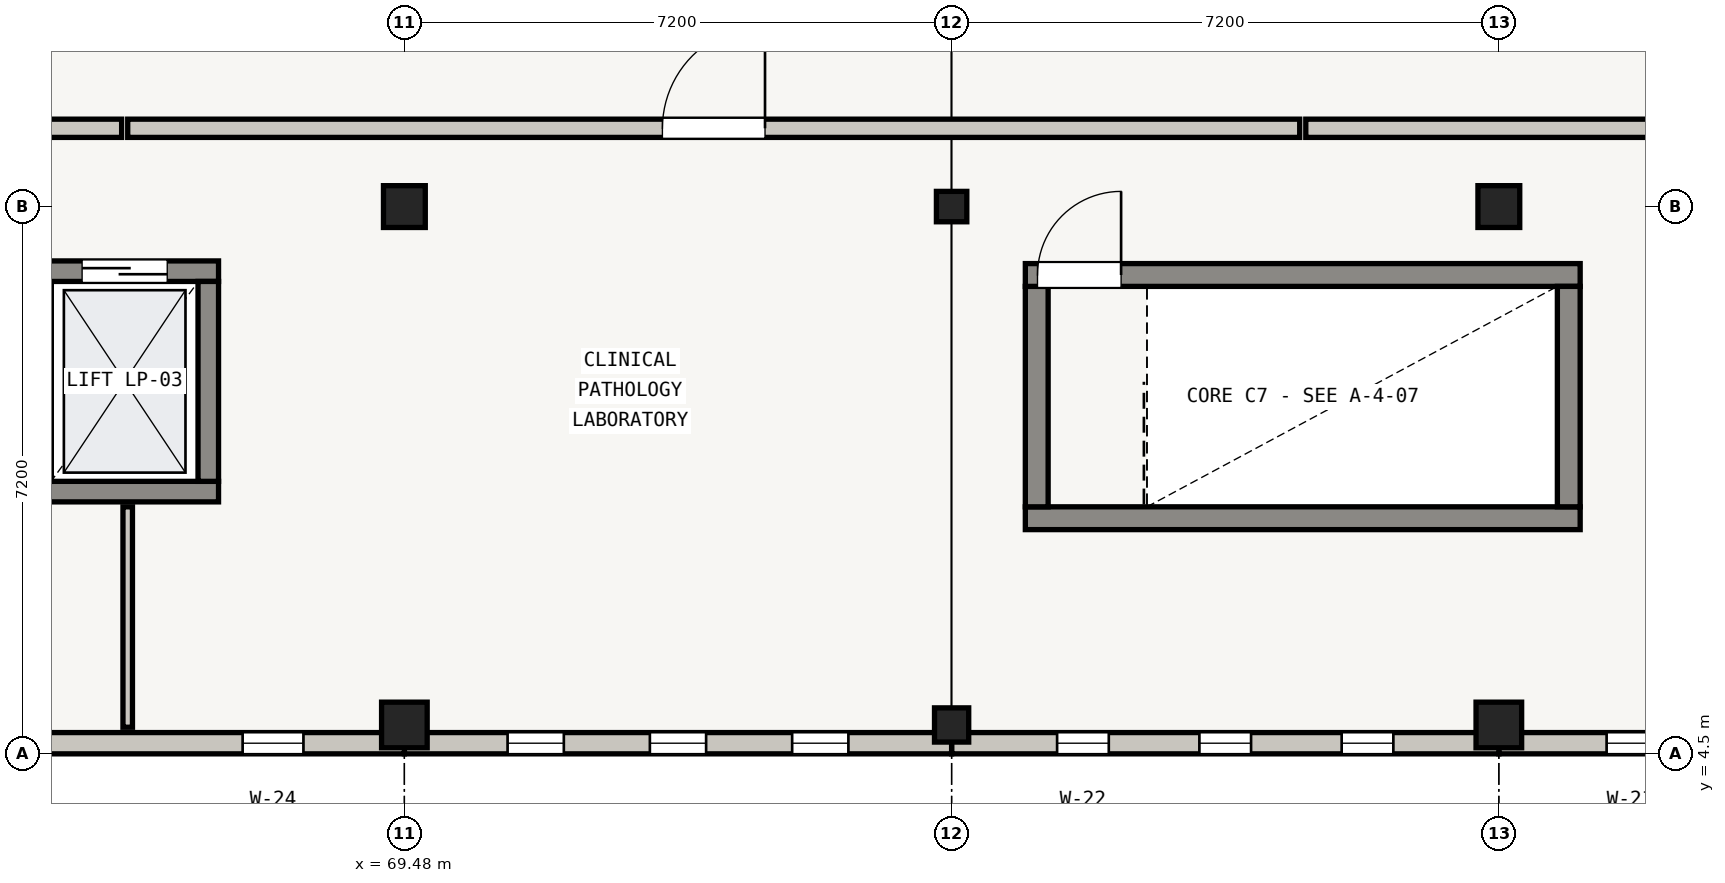
"""IFC4 building model, lengths in metres.
Left out: names, types, materials, properties, quantities, classifications, styles, units other than length and angle.
Written with IfcOpenShell. Run it as: python <this file> out.ifc"""

import sys

from ifc_helpers import new_model, si_unit, direction, frame, frame_2d, origin, origin_2d, place, context, subcontext, project, spatial, rectangle, extrude, element, fill, save


model = new_model("IFC4")
c1 = context("Model", 3, precision=1e-05, world=origin(), true_north=direction((0.0, 1.0)))
c2 = subcontext(c1, "Body", "Model", "MODEL_VIEW")
j1 = project(units=[si_unit("LENGTHUNIT", "METRE"), si_unit("PLANEANGLEUNIT", "RADIAN")], contexts=[c1])
p1 = place(None, origin())
s1 = spatial("IfcSite", under=j1, at=p1, CompositionType="ELEMENT")
p2 = place(p1, origin())
s2 = spatial("IfcBuilding", under=s1, at=p2, CompositionType="ELEMENT")
p3 = place(p2, frame((0.0, 0.0, 4.5)))
s3 = spatial("IfcBuildingStorey", under=s2, at=p3, CompositionType="ELEMENT", Elevation=4.5)
p4 = place(p3, frame((69.48, 4.88, 0.0), z_axis=(0.0, 0.0, 1.0), x_axis=(1.0, 0.0, 0.0)))
e1 = element("IfcColumn", 1, at=p4, inside=s3, PredefinedType="COLUMN", context=c2, shape_type="SweptSolid", body=[
    extrude(rectangle(XDim=0.6, YDim=0.6, at=origin_2d()), origin(), (0.0, 0.0, 1.0), 3.96),
])
p5 = place(p3, frame((69.48, 11.7, 0.0), z_axis=(0.0, 0.0, 1.0), x_axis=(1.0, 0.0, 0.0)))
e2 = element("IfcColumn", 2, at=p5, inside=s3, PredefinedType="COLUMN", context=c2, shape_type="SweptSolid", body=[
    extrude(rectangle(XDim=0.55, YDim=0.55, at=origin_2d()), origin(), (0.0, 0.0, 1.0), 3.96),
])
p6 = place(p3, frame((76.68, 4.88, 0.0), z_axis=(0.0, 0.0, 1.0), x_axis=(1.0, 0.0, 0.0)))
e3 = element("IfcColumn", 3, at=p6, inside=s3, PredefinedType="COLUMN", context=c2, shape_type="SweptSolid", body=[
    extrude(rectangle(XDim=0.45, YDim=0.45, at=origin_2d()), origin(), (0.0, 0.0, 1.0), 3.96),
])
p7 = place(p3, frame((76.68, 11.7, 0.0), z_axis=(0.0, 0.0, 1.0), x_axis=(1.0, 0.0, 0.0)))
e4 = element("IfcColumn", 4, at=p7, inside=s3, PredefinedType="COLUMN", context=c2, shape_type="SweptSolid", body=[
    extrude(rectangle(XDim=0.4, YDim=0.4, at=origin_2d()), origin(), (0.0, 0.0, 1.0), 3.96),
])
p8 = place(p3, frame((83.88, 4.88, 0.0), z_axis=(0.0, 0.0, 1.0), x_axis=(1.0, 0.0, 0.0)))
e5 = element("IfcColumn", 5, at=p8, inside=s3, PredefinedType="COLUMN", context=c2, shape_type="SweptSolid", body=[
    extrude(rectangle(XDim=0.6, YDim=0.6, at=origin_2d()), origin(), (0.0, 0.0, 1.0), 3.96),
])
p9 = place(p3, frame((83.88, 11.7, 0.0), z_axis=(0.0, 0.0, 1.0), x_axis=(1.0, 0.0, 0.0)))
e6 = element("IfcColumn", 6, at=p9, inside=s3, PredefinedType="COLUMN", context=c2, shape_type="SweptSolid", body=[
    extrude(rectangle(XDim=0.55, YDim=0.55, at=origin_2d()), origin(), (0.0, 0.0, 1.0), 3.96),
])
p10 = place(p3, frame((91.08, 4.64, 0.0), z_axis=(0.0, 0.0, 1.0), x_axis=(-1.0, 0.0, 0.0)))
e7 = element("IfcWall", 7, at=p10, inside=s3, PredefinedType="STANDARD", context=c2, shape_type="SweptSolid", body=[
    extrude(rectangle(XDim=7.2, YDim=0.28, at=frame_2d((3.6, 0.0))), origin(), (0.0, 0.0, 1.0), 3.656),
])
p11 = place(p10, frame((1.418, 0.0, 0.55)))
e8 = element("IfcOpeningElement", 8, at=p11, cuts=e7, PredefinedType="OPENING", context=c2, shape_type="SweptSolid", body=[
    extrude(rectangle(XDim=0.62, YDim=2.08, at=frame_2d((0.31, 1.04))), frame((0.0, 0.14, 0.0), z_axis=(0.0, -1.0, 0.0), x_axis=(1.0, 0.0, 0.0)), (0.0, 0.0, 1.0), 0.28),
])
p12 = place(p10, frame((3.29, 0.0, 0.55)))
e9 = element("IfcOpeningElement", 9, at=p12, cuts=e7, PredefinedType="OPENING", context=c2, shape_type="SweptSolid", body=[
    extrude(rectangle(XDim=0.62, YDim=2.08, at=frame_2d((0.31, 1.04))), frame((0.0, 0.14, 0.0), z_axis=(0.0, -1.0, 0.0), x_axis=(1.0, 0.0, 0.0)), (0.0, 0.0, 1.0), 0.28),
])
p13 = place(p10, frame((5.162, 0.0, 0.55)))
e10 = element("IfcOpeningElement", 10, at=p13, cuts=e7, PredefinedType="OPENING", context=c2, shape_type="SweptSolid", body=[
    extrude(rectangle(XDim=0.62, YDim=2.08, at=frame_2d((0.31, 1.04))), frame((0.0, 0.14, 0.0), z_axis=(0.0, -1.0, 0.0), x_axis=(1.0, 0.0, 0.0)), (0.0, 0.0, 1.0), 0.28),
])
p14 = place(p3, frame((83.88, 4.64, 0.0), z_axis=(0.0, 0.0, 1.0), x_axis=(-1.0, 0.0, 0.0)))
e11 = element("IfcWall", 11, at=p14, inside=s3, PredefinedType="STANDARD", context=c2, shape_type="SweptSolid", body=[
    extrude(rectangle(XDim=7.2, YDim=0.28, at=frame_2d((3.6, 0.0))), origin(), (0.0, 0.0, 1.0), 3.656),
])
p15 = place(p14, frame((1.388, 0.0, 0.55)))
e12 = element("IfcOpeningElement", 12, at=p15, cuts=e11, PredefinedType="OPENING", context=c2, shape_type="SweptSolid", body=[
    extrude(rectangle(XDim=0.68, YDim=2.08, at=frame_2d((0.34, 1.04))), frame((0.0, 0.14, 0.0), z_axis=(0.0, -1.0, 0.0), x_axis=(1.0, 0.0, 0.0)), (0.0, 0.0, 1.0), 0.28),
])
p16 = place(p14, frame((3.26, 0.0, 0.55)))
e13 = element("IfcOpeningElement", 13, at=p16, cuts=e11, PredefinedType="OPENING", context=c2, shape_type="SweptSolid", body=[
    extrude(rectangle(XDim=0.68, YDim=2.08, at=frame_2d((0.34, 1.04))), frame((0.0, 0.14, 0.0), z_axis=(0.0, -1.0, 0.0), x_axis=(1.0, 0.0, 0.0)), (0.0, 0.0, 1.0), 0.28),
])
p17 = place(p14, frame((5.132, 0.0, 0.55)))
e14 = element("IfcOpeningElement", 14, at=p17, cuts=e11, PredefinedType="OPENING", context=c2, shape_type="SweptSolid", body=[
    extrude(rectangle(XDim=0.68, YDim=2.08, at=frame_2d((0.34, 1.04))), frame((0.0, 0.14, 0.0), z_axis=(0.0, -1.0, 0.0), x_axis=(1.0, 0.0, 0.0)), (0.0, 0.0, 1.0), 0.28),
])
p18 = place(p3, frame((76.68, 4.64, 0.0), z_axis=(0.0, 0.0, 1.0), x_axis=(-1.0, 0.0, 0.0)))
e15 = element("IfcWall", 15, at=p18, inside=s3, PredefinedType="STANDARD", context=c2, shape_type="SweptSolid", body=[
    extrude(rectangle(XDim=7.2, YDim=0.28, at=frame_2d((3.6, 0.0))), origin(), (0.0, 0.0, 1.0), 3.656),
])
p19 = place(p18, frame((1.358, 0.0, 0.55)))
e16 = element("IfcOpeningElement", 16, at=p19, cuts=e15, PredefinedType="OPENING", context=c2, shape_type="SweptSolid", body=[
    extrude(rectangle(XDim=0.74, YDim=2.04, at=frame_2d((0.37, 1.02))), frame((0.0, 0.14, 0.0), z_axis=(0.0, -1.0, 0.0), x_axis=(1.0, 0.0, 0.0)), (0.0, 0.0, 1.0), 0.28),
])
p20 = place(p18, frame((3.23, 0.0, 0.55)))
e17 = element("IfcOpeningElement", 17, at=p20, cuts=e15, PredefinedType="OPENING", context=c2, shape_type="SweptSolid", body=[
    extrude(rectangle(XDim=0.74, YDim=2.04, at=frame_2d((0.37, 1.02))), frame((0.0, 0.14, 0.0), z_axis=(0.0, -1.0, 0.0), x_axis=(1.0, 0.0, 0.0)), (0.0, 0.0, 1.0), 0.28),
])
p21 = place(p18, frame((5.102, 0.0, 0.55)))
e18 = element("IfcOpeningElement", 18, at=p21, cuts=e15, PredefinedType="OPENING", context=c2, shape_type="SweptSolid", body=[
    extrude(rectangle(XDim=0.74, YDim=2.04, at=frame_2d((0.37, 1.02))), frame((0.0, 0.14, 0.0), z_axis=(0.0, -1.0, 0.0), x_axis=(1.0, 0.0, 0.0)), (0.0, 0.0, 1.0), 0.28),
])
p22 = place(p3, frame((69.48, 4.64, 0.0), z_axis=(0.0, 0.0, 1.0), x_axis=(-1.0, 0.0, 0.0)))
e19 = element("IfcWall", 19, at=p22, inside=s3, PredefinedType="STANDARD", context=c2, shape_type="SweptSolid", body=[
    extrude(rectangle(XDim=7.2, YDim=0.28, at=frame_2d((3.6, 0.0))), origin(), (0.0, 0.0, 1.0), 3.656),
])
p23 = place(p22, frame((1.328, 0.0, 0.55)))
e20 = element("IfcOpeningElement", 20, at=p23, cuts=e19, PredefinedType="OPENING", context=c2, shape_type="SweptSolid", body=[
    extrude(rectangle(XDim=0.8, YDim=2.04, at=frame_2d((0.4, 1.02))), frame((0.0, 0.14, 0.0), z_axis=(0.0, -1.0, 0.0), x_axis=(1.0, 0.0, 0.0)), (0.0, 0.0, 1.0), 0.28),
])
p24 = place(p22, frame((5.072, 0.0, 0.55)))
e21 = element("IfcOpeningElement", 21, at=p24, cuts=e19, PredefinedType="OPENING", context=c2, shape_type="SweptSolid", body=[
    extrude(rectangle(XDim=0.8, YDim=2.04, at=frame_2d((0.4, 1.02))), frame((0.0, 0.14, 0.0), z_axis=(0.0, -1.0, 0.0), x_axis=(1.0, 0.0, 0.0)), (0.0, 0.0, 1.0), 0.28),
])
p25 = place(p3, frame((67.035, 7.95, 0.0), z_axis=(0.0, 0.0, 1.0), x_axis=(-1.0, 0.0, 0.0)))
e22 = element("IfcWall", 22, at=p25, inside=s3, PredefinedType="SHEAR", context=c2, shape_type="SweptSolid", body=[
    extrude(rectangle(XDim=2.47, YDim=0.27, at=frame_2d((1.235, 0.0))), origin(), (0.0, 0.0, 1.0), 3.885),
])
p26 = place(p3, frame((64.565, 10.85, 0.0), z_axis=(0.0, 0.0, 1.0), x_axis=(1.0, 0.0, 0.0)))
e23 = element("IfcWall", 23, at=p26, inside=s3, PredefinedType="SHEAR", context=c2, shape_type="SweptSolid", body=[
    extrude(rectangle(XDim=2.47, YDim=0.27, at=frame_2d((1.235, 0.0))), origin(), (0.0, 0.0, 1.0), 3.885),
])
p27 = place(p26, frame((0.675, 0.0, 0.0)))
e24 = element("IfcOpeningElement", 24, at=p27, cuts=e23, PredefinedType="OPENING", context=c2, shape_type="SweptSolid", body=[
    extrude(rectangle(XDim=1.12, YDim=2.1, at=frame_2d((0.56, 1.05))), frame((0.0, 0.135, 0.0), z_axis=(0.0, -1.0, 0.0), x_axis=(1.0, 0.0, 0.0)), (0.0, 0.0, 1.0), 0.27),
])
p28 = place(p3, frame((66.9, 10.715, 0.0), z_axis=(0.0, 0.0, 1.0), x_axis=(0.0, -1.0, 0.0)))
e25 = element("IfcWall", 25, at=p28, inside=s3, PredefinedType="SHEAR", context=c2, shape_type="SweptSolid", body=[
    extrude(rectangle(XDim=2.63, YDim=0.27, at=frame_2d((1.315, 0.0))), origin(), (0.0, 0.0, 1.0), 3.885),
])
p29 = place(p3, frame((84.95, 7.6, 0.0), z_axis=(0.0, 0.0, 1.0), x_axis=(-1.0, 0.0, 0.0)))
e26 = element("IfcWall", 26, at=p29, inside=s3, PredefinedType="SHEAR", context=c2, shape_type="SweptSolid", body=[
    extrude(rectangle(XDim=7.3, YDim=0.3, at=frame_2d((3.65, 0.0))), origin(), (0.0, 0.0, 1.0), 3.885),
])
p30 = place(p3, frame((77.8, 7.75, 0.0), z_axis=(0.0, 0.0, 1.0), x_axis=(0.0, 1.0, 0.0)))
e27 = element("IfcWall", 27, at=p30, inside=s3, PredefinedType="SHEAR", context=c2, shape_type="SweptSolid", body=[
    extrude(rectangle(XDim=2.9, YDim=0.3, at=frame_2d((1.45, 0.0))), origin(), (0.0, 0.0, 1.0), 3.885),
])
p31 = place(p3, frame((77.65, 10.8, 0.0), z_axis=(0.0, 0.0, 1.0), x_axis=(1.0, 0.0, 0.0)))
e28 = element("IfcWall", 28, at=p31, inside=s3, PredefinedType="SHEAR", context=c2, shape_type="SweptSolid", body=[
    extrude(rectangle(XDim=7.3, YDim=0.3, at=frame_2d((3.65, 0.0))), origin(), (0.0, 0.0, 1.0), 3.885),
])
p32 = place(p31, frame((0.16, 0.0, 0.0)))
e29 = element("IfcOpeningElement", 29, at=p32, cuts=e28, PredefinedType="OPENING", context=c2, shape_type="SweptSolid", body=[
    extrude(rectangle(XDim=1.1, YDim=2.05, at=frame_2d((0.55, 1.025))), frame((0.0, 0.15, 0.0), z_axis=(0.0, -1.0, 0.0), x_axis=(1.0, 0.0, 0.0)), (0.0, 0.0, 1.0), 0.3),
])
p33 = place(p3, frame((84.8, 10.65, 0.0), z_axis=(0.0, 0.0, 1.0), x_axis=(0.0, -1.0, 0.0)))
e30 = element("IfcWall", 30, at=p33, inside=s3, PredefinedType="SHEAR", context=c2, shape_type="SweptSolid", body=[
    extrude(rectangle(XDim=2.9, YDim=0.3, at=frame_2d((1.45, 0.0))), origin(), (0.0, 0.0, 1.0), 3.885),
])
p34 = place(p3, frame((65.84, 12.73, 0.0), z_axis=(0.0, 0.0, 1.0), x_axis=(1.0, 0.0, 0.0)))
e31 = element("IfcWall", 31, at=p34, inside=s3, PredefinedType="SOLIDWALL", context=c2, shape_type="SweptSolid", body=[
    extrude(rectangle(XDim=15.42, YDim=0.24, at=frame_2d((7.71, 0.0))), origin(), (0.0, 0.0, 1.0), 2.905),
])
p35 = place(p34, frame((7.035, 0.0, 0.0)))
e32 = element("IfcOpeningElement", 32, at=p35, cuts=e31, PredefinedType="OPENING", context=c2, shape_type="SweptSolid", body=[
    extrude(rectangle(XDim=1.35, YDim=2.1, at=frame_2d((0.675, 1.05))), frame((0.0, 0.12, 0.0), z_axis=(0.0, -1.0, 0.0), x_axis=(1.0, 0.0, 0.0)), (0.0, 0.0, 1.0), 0.24),
])
p36 = place(p3, frame((65.84, 4.85, 0.0), z_axis=(0.0, 0.0, 1.0), x_axis=(0.0, 1.0, 0.0)))
e33 = element("IfcWall", 33, at=p36, inside=s3, PredefinedType="PARTITIONING", context=c2, shape_type="SweptSolid", body=[
    extrude(rectangle(XDim=2.9, YDim=0.125, at=frame_2d((1.45, 0.0))), origin(), (0.0, 0.0, 1.0), 2.905),
])
p37 = place(p3, frame((81.34, 12.73, 0.0), z_axis=(0.0, 0.0, 1.0), x_axis=(1.0, 0.0, 0.0)))
e34 = element("IfcWall", 34, at=p37, inside=s3, PredefinedType="SOLIDWALL", context=c2, shape_type="SweptSolid", body=[
    extrude(rectangle(XDim=11.815, YDim=0.24, at=frame_2d((5.907, 0.0))), origin(), (0.0, 0.0, 1.0), 2.905),
])
p38 = place(p37, frame((5.232, 0.0, 0.0)))
e35 = element("IfcOpeningElement", 35, at=p38, cuts=e34, PredefinedType="OPENING", context=c2, shape_type="SweptSolid", body=[
    extrude(rectangle(XDim=1.35, YDim=2.1, at=frame_2d((0.675, 1.05))), frame((0.0, 0.12, 0.0), z_axis=(0.0, -1.0, 0.0), x_axis=(1.0, 0.0, 0.0)), (0.0, 0.0, 1.0), 0.24),
])
p39 = place(p3, frame((59.84, 12.73, 0.0), z_axis=(0.0, 0.0, 1.0), x_axis=(1.0, 0.0, 0.0)))
e36 = element("IfcWall", 36, at=p39, inside=s3, PredefinedType="SOLIDWALL", context=c2, shape_type="SweptSolid", body=[
    extrude(rectangle(XDim=5.92, YDim=0.24, at=frame_2d((2.96, 0.0))), origin(), (0.0, 0.0, 1.0), 2.905),
])
p40 = place(p39, frame((3.427, 0.0, 0.0)))
e37 = element("IfcOpeningElement", 37, at=p40, cuts=e36, PredefinedType="OPENING", context=c2, shape_type="SweptSolid", body=[
    extrude(rectangle(XDim=1.35, YDim=2.1, at=frame_2d((0.675, 1.05))), frame((0.0, 0.12, 0.0), z_axis=(0.0, -1.0, 0.0), x_axis=(1.0, 0.0, 0.0)), (0.0, 0.0, 1.0), 0.24),
])
p41 = place(p13, origin())
e38 = element("IfcWindow", 38, at=p41, inside=s3, PartitioningType="SINGLE_PANEL", PredefinedType="WINDOW", context=c2, shape_type="SweptSolid", body=[
    extrude(rectangle(XDim=0.62, YDim=2.08, at=frame_2d((0.31, 1.04))), frame((0.0, 0.03, 0.0), z_axis=(0.0, -1.0, 0.0), x_axis=(1.0, 0.0, 0.0)), (0.0, 0.0, 1.0), 0.06),
])
fill(e10, e38)
p42 = place(p15, origin())
e39 = element("IfcWindow", 39, at=p42, inside=s3, PartitioningType="SINGLE_PANEL", PredefinedType="WINDOW", context=c2, shape_type="SweptSolid", body=[
    extrude(rectangle(XDim=0.68, YDim=2.08, at=frame_2d((0.34, 1.04))), frame((0.0, 0.03, 0.0), z_axis=(0.0, -1.0, 0.0), x_axis=(1.0, 0.0, 0.0)), (0.0, 0.0, 1.0), 0.06),
])
fill(e12, e39)
p43 = place(p16, origin())
e40 = element("IfcWindow", 40, at=p43, inside=s3, PartitioningType="SINGLE_PANEL", PredefinedType="WINDOW", context=c2, shape_type="SweptSolid", body=[
    extrude(rectangle(XDim=0.68, YDim=2.08, at=frame_2d((0.34, 1.04))), frame((0.0, 0.03, 0.0), z_axis=(0.0, -1.0, 0.0), x_axis=(1.0, 0.0, 0.0)), (0.0, 0.0, 1.0), 0.06),
])
fill(e13, e40)
p44 = place(p17, origin())
e41 = element("IfcWindow", 41, at=p44, inside=s3, PartitioningType="SINGLE_PANEL", PredefinedType="WINDOW", context=c2, shape_type="SweptSolid", body=[
    extrude(rectangle(XDim=0.68, YDim=2.08, at=frame_2d((0.34, 1.04))), frame((0.0, 0.03, 0.0), z_axis=(0.0, -1.0, 0.0), x_axis=(1.0, 0.0, 0.0)), (0.0, 0.0, 1.0), 0.06),
])
fill(e14, e41)
p45 = place(p19, origin())
e42 = element("IfcWindow", 42, at=p45, inside=s3, PartitioningType="SINGLE_PANEL", PredefinedType="WINDOW", context=c2, shape_type="SweptSolid", body=[
    extrude(rectangle(XDim=0.74, YDim=2.04, at=frame_2d((0.37, 1.02))), frame((0.0, 0.03, 0.0), z_axis=(0.0, -1.0, 0.0), x_axis=(1.0, 0.0, 0.0)), (0.0, 0.0, 1.0), 0.06),
])
fill(e16, e42)
p46 = place(p20, origin())
e43 = element("IfcWindow", 43, at=p46, inside=s3, PartitioningType="SINGLE_PANEL", PredefinedType="WINDOW", context=c2, shape_type="SweptSolid", body=[
    extrude(rectangle(XDim=0.74, YDim=2.04, at=frame_2d((0.37, 1.02))), frame((0.0, 0.03, 0.0), z_axis=(0.0, -1.0, 0.0), x_axis=(1.0, 0.0, 0.0)), (0.0, 0.0, 1.0), 0.06),
])
fill(e17, e43)
p47 = place(p21, origin())
e44 = element("IfcWindow", 44, at=p47, inside=s3, PartitioningType="SINGLE_PANEL", PredefinedType="WINDOW", context=c2, shape_type="SweptSolid", body=[
    extrude(rectangle(XDim=0.74, YDim=2.04, at=frame_2d((0.37, 1.02))), frame((0.0, 0.03, 0.0), z_axis=(0.0, -1.0, 0.0), x_axis=(1.0, 0.0, 0.0)), (0.0, 0.0, 1.0), 0.06),
])
fill(e18, e44)
p48 = place(p23, origin())
e45 = element("IfcWindow", 45, at=p48, inside=s3, PartitioningType="SINGLE_PANEL", PredefinedType="WINDOW", context=c2, shape_type="SweptSolid", body=[
    extrude(rectangle(XDim=0.8, YDim=2.04, at=frame_2d((0.4, 1.02))), frame((0.0, 0.03, 0.0), z_axis=(0.0, -1.0, 0.0), x_axis=(1.0, 0.0, 0.0)), (0.0, 0.0, 1.0), 0.06),
])
fill(e20, e45)
p49 = place(p27, origin())
e46 = element("IfcDoor", 46, at=p49, inside=s3, OperationType="DOUBLE_DOOR_SLIDING", PredefinedType="DOOR", context=c2, shape_type="SweptSolid", body=[
    extrude(rectangle(XDim=1.12, YDim=2.1, at=frame_2d((0.56, 1.05))), frame((0.0, 0.025, 0.0), z_axis=(0.0, -1.0, 0.0), x_axis=(1.0, 0.0, 0.0)), (0.0, 0.0, 1.0), 0.05),
])
fill(e24, e46)
p50 = place(p32, origin())
e47 = element("IfcDoor", 47, at=p50, inside=s3, OperationType="SINGLE_SWING_RIGHT", PredefinedType="DOOR", context=c2, shape_type="SweptSolid", body=[
    extrude(rectangle(XDim=1.1, YDim=2.05, at=frame_2d((0.55, 1.025))), frame((0.0, 0.025, 0.0), z_axis=(0.0, -1.0, 0.0), x_axis=(1.0, 0.0, 0.0)), (0.0, 0.0, 1.0), 0.05),
])
fill(e29, e47)
p51 = place(p35, origin())
e48 = element("IfcDoor", 48, at=p51, inside=s3, OperationType="SINGLE_SWING_RIGHT", PredefinedType="DOOR", context=c2, shape_type="SweptSolid", body=[
    extrude(rectangle(XDim=1.35, YDim=2.1, at=frame_2d((0.675, 1.05))), frame((0.0, 0.025, 0.0), z_axis=(0.0, -1.0, 0.0), x_axis=(1.0, 0.0, 0.0)), (0.0, 0.0, 1.0), 0.05),
])
fill(e32, e48)
save(model, sys.argv[1])
